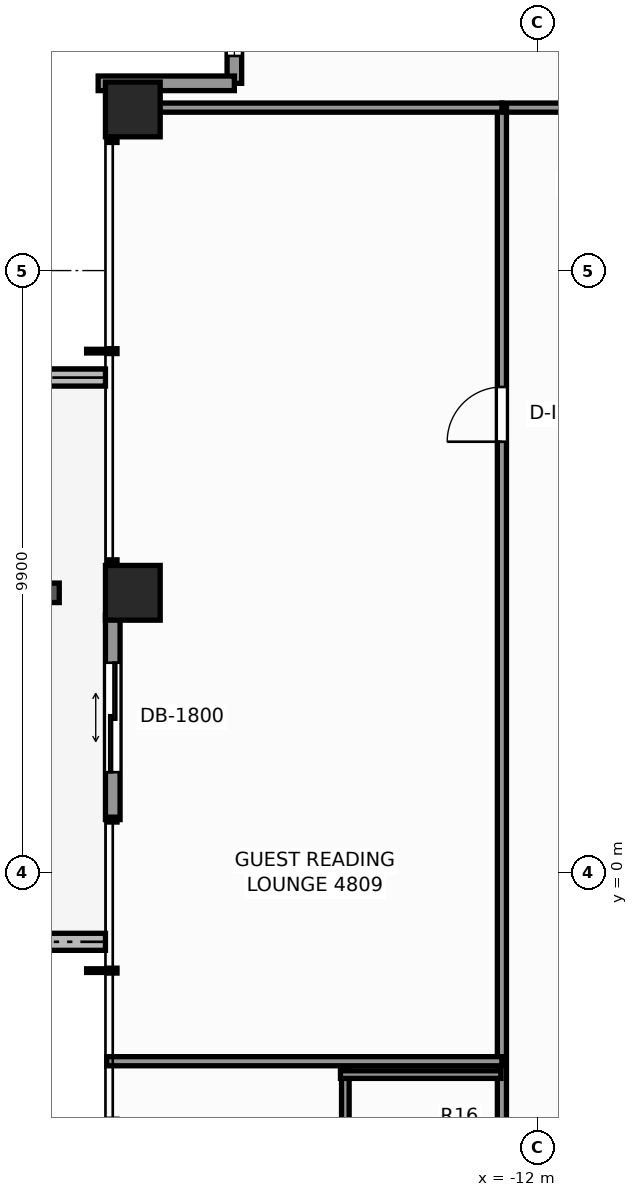
"""IFC4 building model, lengths in metres.
Left out: names, types, materials, properties, quantities, classifications, styles, units other than length and angle.
Written with IfcOpenShell. Run it as: python <this file> out.ifc"""

import sys

from ifc_helpers import new_model, si_unit, direction, frame, frame_2d, origin, origin_2d, place, context, subcontext, project, spatial, rectangle, extrude, element, fill, save


model = new_model("IFC4")
c1 = context("Model", 3, precision=1e-05, world=origin(), true_north=direction((0.0, 1.0)))
c2 = subcontext(c1, "Body", "Model", "MODEL_VIEW")
j1 = project(units=[si_unit("LENGTHUNIT", "METRE"), si_unit("PLANEANGLEUNIT", "RADIAN")], contexts=[c1])
p1 = place(None, origin())
s1 = spatial("IfcSite", under=j1, at=p1, CompositionType="ELEMENT")
p2 = place(p1, origin())
s2 = spatial("IfcBuilding", under=s1, at=p2, CompositionType="ELEMENT")
p3 = place(p2, frame((0.0, 0.0, 166.8)))
s3 = spatial("IfcBuildingStorey", under=s2, at=p3, CompositionType="ELEMENT", Elevation=166.8)
for number, where, z_axis, x_axis in (
    (1, (-18.65, 4.6, 0.0), (0.0, 0.0, 1.0), (1.0, 0.0, 0.0)),
    (2, (-18.65, 12.55, 0.0), (0.0, 0.0, 1.0), (1.0, 0.0, 0.0)),
):
    element("IfcColumn", number, at=place(p3, frame(where, z_axis=z_axis, x_axis=x_axis)), inside=s3, PredefinedType="COLUMN", context=c2, shape_type="SweptSolid", body=[
        extrude(rectangle(XDim=0.9, YDim=0.9, at=origin_2d()), origin(), (0.0, 0.0, 1.0), 3.3),
    ])
for number, where, z_axis, x_axis in (
    (3, (-22.4, -1.14, -0.02), (0.0, 0.0, 1.0), (1.0, 0.0, 0.0)),
    (4, (-19.1, 8.14, -0.02), (0.0, 0.0, 1.0), (-1.0, 0.0, 0.0)),
):
    element("IfcWall", number, at=place(p3, frame(where, z_axis=z_axis, x_axis=x_axis)), inside=s3, PredefinedType="PARAPET", context=c2, shape_type="SweptSolid", body=[
        extrude(rectangle(XDim=3.3, YDim=0.28, at=frame_2d((1.65, 0.0))), origin(), (0.0, 0.0, 1.0), 0.42),
    ])
p4 = place(p3, frame((-16.98, 12.98, 0.0), z_axis=(0.0, 0.0, 1.0), x_axis=(0.0, 1.0, 0.0)))
e5 = element("IfcWall", 5, at=p4, inside=s3, PredefinedType="STANDARD", context=c2, shape_type="SweptSolid", body=[
    extrude(rectangle(XDim=2.24, YDim=0.24, at=frame_2d((1.12, 0.0))), origin(), (0.0, 0.0, 1.0), 2.483),
])
p5 = place(p4, frame((0.45, 0.0, 0.65)))
e6 = element("IfcOpeningElement", 6, at=p5, cuts=e5, PredefinedType="OPENING", context=c2, shape_type="SweptSolid", body=[
    extrude(rectangle(XDim=1.1, YDim=1.45, at=frame_2d((0.55, 0.725))), frame((0.0, 0.13, 0.0), z_axis=(0.0, -1.0, 0.0), x_axis=(1.0, 0.0, 0.0)), (0.0, 0.0, 1.0), 0.26),
])
p6 = place(p3, frame((-19.22, 12.98, 0.0), z_axis=(0.0, 0.0, 1.0), x_axis=(1.0, 0.0, 0.0)))
e7 = element("IfcWall", 7, at=p6, inside=s3, PredefinedType="STANDARD", context=c2, shape_type="SweptSolid", body=[
    extrude(rectangle(XDim=2.24, YDim=0.24, at=frame_2d((1.12, 0.0))), origin(), (0.0, 0.0, 1.0), 2.483),
])
p7 = place(p3, frame((-18.98, 0.87, 0.0), z_axis=(0.0, 0.0, 1.0), x_axis=(0.0, 1.0, 0.0)))
e8 = element("IfcWall", 8, at=p7, inside=s3, PredefinedType="STANDARD", context=c2, shape_type="SweptSolid", body=[
    extrude(rectangle(XDim=3.36, YDim=0.24, at=frame_2d((1.68, 0.0))), origin(), (0.0, 0.0, 1.0), 3.1),
])
p8 = place(p7, frame((0.78, 0.0, 0.0)))
e9 = element("IfcOpeningElement", 9, at=p8, cuts=e8, PredefinedType="OPENING", context=c2, shape_type="SweptSolid", body=[
    extrude(rectangle(XDim=1.8, YDim=2.2, at=frame_2d((0.9, 1.1))), frame((0.0, 0.13, 0.0), z_axis=(0.0, -1.0, 0.0), x_axis=(1.0, 0.0, 0.0)), (0.0, 0.0, 1.0), 0.26),
])
p9 = place(p3, frame((-12.58, 12.58, 0.0), z_axis=(0.0, 0.0, 1.0), x_axis=(1.0, 0.0, 0.0)))
e10 = element("IfcWall", 10, at=p9, inside=s3, PredefinedType="PARTITIONING", context=c2, shape_type="SweptSolid", body=[
    extrude(rectangle(XDim=25.0, YDim=0.15, at=frame_2d((12.5, 0.0))), origin(), (0.0, 0.0, 1.0), 2.389),
])
p10 = place(p9, frame((4.595, 0.0, 0.0)))
e11 = element("IfcOpeningElement", 11, at=p10, cuts=e10, PredefinedType="OPENING", context=c2, shape_type="SweptSolid", body=[
    extrude(rectangle(XDim=0.9, YDim=2.06, at=frame_2d((0.45, 1.03))), frame((0.0, 0.085, 0.0), z_axis=(0.0, -1.0, 0.0), x_axis=(1.0, 0.0, 0.0)), (0.0, 0.0, 1.0), 0.17),
])
p11 = place(p9, frame((19.64, 0.0, 0.0)))
e12 = element("IfcOpeningElement", 12, at=p11, cuts=e10, PredefinedType="OPENING", context=c2, shape_type="SweptSolid", body=[
    extrude(rectangle(XDim=0.95, YDim=2.06, at=frame_2d((0.475, 1.03))), frame((0.0, 0.085, 0.0), z_axis=(0.0, -1.0, 0.0), x_axis=(1.0, 0.0, 0.0)), (0.0, 0.0, 1.0), 0.17),
])
p12 = place(p3, frame((-12.58, -12.26, 0.0), z_axis=(0.0, 0.0, 1.0), x_axis=(0.0, 1.0, 0.0)))
e13 = element("IfcWall", 13, at=p12, inside=s3, PredefinedType="PARTITIONING", context=c2, shape_type="SweptSolid", body=[
    extrude(rectangle(XDim=24.84, YDim=0.15, at=frame_2d((12.42, 0.0))), origin(), (0.0, 0.0, 1.0), 2.389),
])
p13 = place(p12, frame((3.913, 0.0, 0.0)))
e14 = element("IfcOpeningElement", 14, at=p13, cuts=e13, PredefinedType="OPENING", context=c2, shape_type="SweptSolid", body=[
    extrude(rectangle(XDim=0.95, YDim=2.06, at=frame_2d((0.475, 1.03))), frame((0.0, 0.085, 0.0), z_axis=(0.0, -1.0, 0.0), x_axis=(1.0, 0.0, 0.0)), (0.0, 0.0, 1.0), 0.17),
])
p14 = place(p12, frame((19.345, 0.0, 0.0)))
e15 = element("IfcOpeningElement", 15, at=p14, cuts=e13, PredefinedType="OPENING", context=c2, shape_type="SweptSolid", body=[
    extrude(rectangle(XDim=0.9, YDim=2.06, at=frame_2d((0.45, 1.03))), frame((0.0, 0.085, 0.0), z_axis=(0.0, -1.0, 0.0), x_axis=(1.0, 0.0, 0.0)), (0.0, 0.0, 1.0), 0.17),
])
p15 = place(p3, frame((-19.08, 12.58, 0.0), z_axis=(0.0, 0.0, 1.0), x_axis=(1.0, 0.0, 0.0)))
e16 = element("IfcWall", 16, at=p15, inside=s3, PredefinedType="PARTITIONING", context=c2, shape_type="SweptSolid", body=[
    extrude(rectangle(XDim=6.5, YDim=0.15, at=frame_2d((3.25, 0.0))), origin(), (0.0, 0.0, 1.0), 2.389),
])
p16 = place(p3, frame((-19.08, -3.104, 0.0), z_axis=(0.0, 0.0, 1.0), x_axis=(1.0, 0.0, 0.0)))
e17 = element("IfcWall", 17, at=p16, inside=s3, PredefinedType="PARTITIONING", context=c2, shape_type="SweptSolid", body=[
    extrude(rectangle(XDim=6.5, YDim=0.15, at=frame_2d((3.25, 0.0))), origin(), (0.0, 0.0, 1.0), 2.473),
])
p17 = place(p3, frame((-15.155, -5.784, 0.0), z_axis=(0.0, 0.0, 1.0), x_axis=(0.0, 1.0, 0.0)))
e18 = element("IfcWall", 18, at=p17, inside=s3, PredefinedType="PARTITIONING", context=c2, shape_type="SweptSolid", body=[
    extrude(rectangle(XDim=2.52, YDim=0.125, at=frame_2d((1.26, 0.0))), origin(), (0.0, 0.0, 1.0), 2.389),
])
p18 = place(p3, frame((-15.235, -3.324, 0.0), z_axis=(0.0, 0.0, 1.0), x_axis=(1.0, 0.0, 0.0)))
e19 = element("IfcWall", 19, at=p18, inside=s3, PredefinedType="PARTITIONING", context=c2, shape_type="SweptSolid", body=[
    extrude(rectangle(XDim=2.64, YDim=0.125, at=frame_2d((1.32, 0.0))), origin(), (0.0, 0.0, 1.0), 3.1),
])
p19 = place(p5, origin())
e20 = element("IfcWindow", 20, at=p19, inside=s3, PartitioningType="SINGLE_PANEL", PredefinedType="WINDOW", context=c2, shape_type="SweptSolid", body=[
    extrude(rectangle(XDim=1.1, YDim=1.45, at=frame_2d((0.55, 0.725))), frame((0.0, 0.03, 0.0), z_axis=(0.0, -1.0, 0.0), x_axis=(1.0, 0.0, 0.0)), (0.0, 0.0, 1.0), 0.06),
])
fill(e6, e20)
p20 = place(p8, origin())
e21 = element("IfcDoor", 21, at=p20, inside=s3, OperationType="DOUBLE_DOOR_SLIDING", PredefinedType="DOOR", context=c2, shape_type="SweptSolid", body=[
    extrude(rectangle(XDim=1.8, YDim=2.2, at=frame_2d((0.9, 1.1))), frame((0.0, 0.025, 0.0), z_axis=(0.0, -1.0, 0.0), x_axis=(1.0, 0.0, 0.0)), (0.0, 0.0, 1.0), 0.05),
])
fill(e9, e21)
p21 = place(p14, origin())
e22 = element("IfcDoor", 22, at=p21, inside=s3, OperationType="SINGLE_SWING_LEFT", PredefinedType="DOOR", context=c2, shape_type="SweptSolid", body=[
    extrude(rectangle(XDim=0.9, YDim=2.06, at=frame_2d((0.45, 1.03))), frame((0.0, 0.025, 0.0), z_axis=(0.0, -1.0, 0.0), x_axis=(1.0, 0.0, 0.0)), (0.0, 0.0, 1.0), 0.05),
])
fill(e15, e22)
save(model, sys.argv[1])
